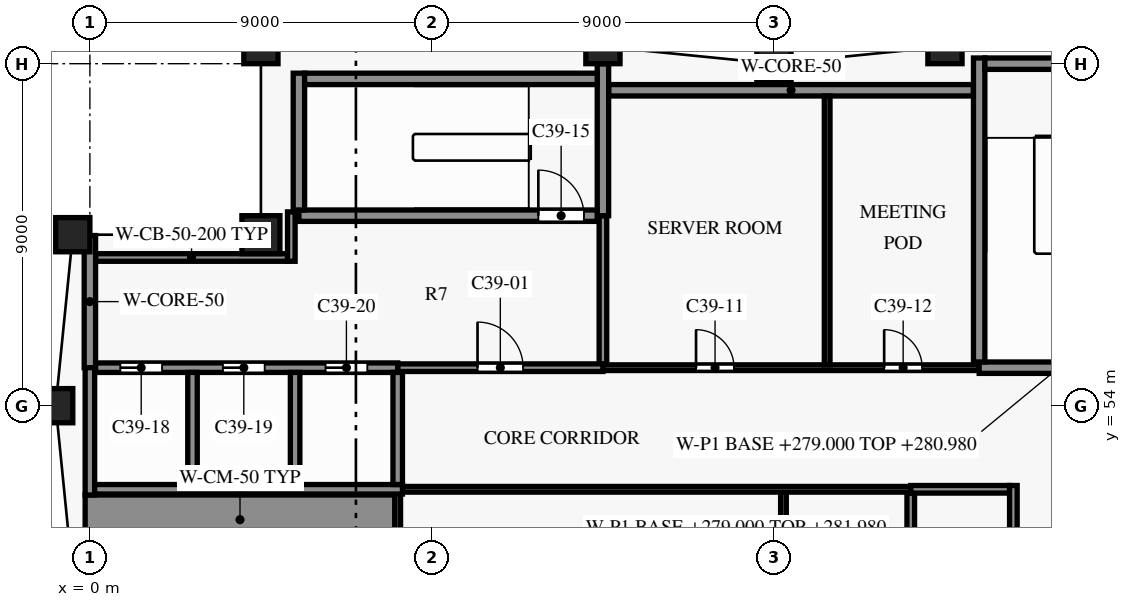
"""IFC4 building model, lengths in metres.
Left out: names, types, materials, properties, quantities, classifications, styles, units other than length and angle.
Written with IfcOpenShell. Run it as: python <this file> out.ifc"""

import sys

from ifc_helpers import new_model, si_unit, direction, frame, frame_2d, origin, origin_2d, place, context, subcontext, project, spatial, rectangle, extrude, element, fill, save


model = new_model("IFC4")
c1 = context("Model", 3, precision=1e-05, world=origin(), true_north=direction((0.0, 1.0)))
c2 = subcontext(c1, "Body", "Model", "MODEL_VIEW")
j1 = project(units=[si_unit("LENGTHUNIT", "METRE"), si_unit("PLANEANGLEUNIT", "RADIAN")], contexts=[c1])
p1 = place(None, origin())
s1 = spatial("IfcSite", under=j1, at=p1, CompositionType="ELEMENT")
p2 = place(p1, origin())
s2 = spatial("IfcBuilding", under=s1, at=p2, CompositionType="ELEMENT")
p3 = place(p2, frame((0.0, 0.0, 279.0)))
s3 = spatial("IfcBuildingStorey", under=s2, at=p3, CompositionType="ELEMENT", Elevation=279.0)
for number, where, z_axis, x_axis in (
    (1, (22.5, 63.45, 0.0), (0.0, 0.0, 1.0), (-0.995, -0.1, 0.0)),
    (2, (18.0, 63.0, 0.0), (0.0, 0.0, 1.0), (-1.0, 0.0, 0.0)),
    (3, (13.5, 63.45, 0.0), (0.0, 0.0, 1.0), (-0.995, 0.1, 0.0)),
    (4, (4.5, 63.45, 0.0), (0.0, 0.0, 1.0), (-0.995, -0.1, 0.0)),
    (5, (-0.45, 58.5, 0.0), (0.0, 0.0, 1.0), (-0.1, -0.995, 0.0)),
    (6, (-0.9, 54.0, 0.0), (0.0, 0.0, 1.0), (0.0, -1.0, 0.0)),
):
    element("IfcColumn", number, at=place(p3, frame(where, z_axis=z_axis, x_axis=x_axis)), inside=s3, PredefinedType="COLUMN", context=c2, shape_type="SweptSolid", body=[
        extrude(rectangle(XDim=0.9, YDim=0.9, at=origin_2d()), origin(), (0.0, 0.0, 1.0), 3.8),
    ])
p4 = place(p3, frame((4.5, 58.5, 0.0), z_axis=(0.0, 0.0, 1.0), x_axis=(1.0, 0.0, 0.0)))
e7 = element("IfcColumn", 7, at=p4, inside=s3, PredefinedType="COLUMN", context=c2, shape_type="SweptSolid", body=[
    extrude(rectangle(XDim=1.0, YDim=1.0, at=origin_2d()), origin(), (0.0, 0.0, 1.0), 3.8),
])
p5 = place(p3, frame((-0.125, 51.0, 0.0), z_axis=(0.0, 0.0, 1.0), x_axis=(1.0, 0.0, 0.0)))
e8 = element("IfcWall", 8, at=p5, inside=s3, PredefinedType="SHEAR", context=c2, shape_type="SweptSolid", body=[
    extrude(rectangle(XDim=8.15, YDim=1.3, at=frame_2d((4.075, 0.0))), origin(), (0.0, 0.0, 1.0), 3.5),
])
p6 = place(p3, frame((8.225, 51.8, 0.0), z_axis=(0.0, 0.0, 1.0), x_axis=(1.0, 0.0, 0.0)))
e9 = element("IfcWall", 9, at=p6, inside=s3, PredefinedType="SHEAR", context=c2, shape_type="SweptSolid", body=[
    extrude(rectangle(XDim=13.375, YDim=0.15, at=frame_2d((6.688, 0.0))), origin(), (0.0, 0.0, 1.0), 3.5),
])
p7 = place(p3, frame((21.6, 51.8, 0.0), z_axis=(0.0, 0.0, 1.0), x_axis=(1.0, 0.0, 0.0)))
e10 = element("IfcWall", 10, at=p7, inside=s3, PredefinedType="SHEAR", context=c2, shape_type="SweptSolid", body=[
    extrude(rectangle(XDim=2.6, YDim=0.2, at=frame_2d((1.3, 0.0))), origin(), (0.0, 0.0, 1.0), 3.5),
])
p8 = place(p3, frame((0.125, 51.8, 0.0), z_axis=(0.0, 0.0, 1.0), x_axis=(1.0, 0.0, 0.0)))
e11 = element("IfcWall", 11, at=p8, inside=s3, PredefinedType="SHEAR", context=c2, shape_type="SweptSolid", body=[
    extrude(rectangle(XDim=8.1, YDim=0.25, at=frame_2d((4.05, 0.0))), origin(), (0.0, 0.0, 1.0), 3.5),
])
p9 = place(p3, frame((8.1, 55.0, 0.0), z_axis=(0.0, 0.0, 1.0), x_axis=(1.0, 0.0, 0.0)))
e12 = element("IfcWall", 12, at=p9, inside=s3, PredefinedType="SHEAR", context=c2, shape_type="SweptSolid", body=[
    extrude(rectangle(XDim=5.4, YDim=0.2, at=frame_2d((2.7, 0.0))), origin(), (0.0, 0.0, 1.0), 3.5),
])
p10 = place(p9, frame((2.1, 0.0, 0.0)))
e13 = element("IfcOpeningElement", 13, at=p10, cuts=e12, PredefinedType="OPENING", context=c2, shape_type="SweptSolid", body=[
    extrude(rectangle(XDim=1.2, YDim=2.2, at=frame_2d((0.6, 1.1))), frame((0.0, 0.11, 0.0), z_axis=(0.0, -1.0, 0.0), x_axis=(1.0, 0.0, 0.0)), (0.0, 0.0, 1.0), 0.22),
])
p11 = place(p3, frame((13.5, 55.0, 0.0), z_axis=(0.0, 0.0, 1.0), x_axis=(1.0, 0.0, 0.0)))
e14 = element("IfcWall", 14, at=p11, inside=s3, PredefinedType="SHEAR", context=c2, shape_type="SweptSolid", body=[
    extrude(rectangle(XDim=9.9, YDim=0.15, at=frame_2d((4.95, 0.0))), origin(), (0.0, 0.0, 1.0), 3.5),
])
p12 = place(p11, frame((2.45, 0.0, 0.0)))
e15 = element("IfcOpeningElement", 15, at=p12, cuts=e14, PredefinedType="OPENING", context=c2, shape_type="SweptSolid", body=[
    extrude(rectangle(XDim=1.0, YDim=2.1, at=frame_2d((0.5, 1.05))), frame((0.0, 0.085, 0.0), z_axis=(0.0, -1.0, 0.0), x_axis=(1.0, 0.0, 0.0)), (0.0, 0.0, 1.0), 0.17),
])
p13 = place(p11, frame((7.4, 0.0, 0.0)))
e16 = element("IfcOpeningElement", 16, at=p13, cuts=e14, PredefinedType="OPENING", context=c2, shape_type="SweptSolid", body=[
    extrude(rectangle(XDim=1.0, YDim=2.1, at=frame_2d((0.5, 1.05))), frame((0.0, 0.085, 0.0), z_axis=(0.0, -1.0, 0.0), x_axis=(1.0, 0.0, 0.0)), (0.0, 0.0, 1.0), 0.17),
])
p14 = place(p3, frame((0.15, 55.0, 0.0), z_axis=(0.0, 0.0, 1.0), x_axis=(1.0, 0.0, 0.0)))
e17 = element("IfcWall", 17, at=p14, inside=s3, PredefinedType="SHEAR", context=c2, shape_type="SweptSolid", body=[
    extrude(rectangle(XDim=7.95, YDim=0.25, at=frame_2d((3.975, 0.0))), origin(), (0.0, 0.0, 1.0), 3.5),
])
p15 = place(p14, frame((0.65, 0.0, 0.0)))
e18 = element("IfcOpeningElement", 18, at=p15, cuts=e17, PredefinedType="OPENING", context=c2, shape_type="SweptSolid", body=[
    extrude(rectangle(XDim=1.1, YDim=2.1, at=frame_2d((0.55, 1.05))), frame((0.0, 0.135, 0.0), z_axis=(0.0, -1.0, 0.0), x_axis=(1.0, 0.0, 0.0)), (0.0, 0.0, 1.0), 0.27),
])
p16 = place(p14, frame((3.35, 0.0, 0.0)))
e19 = element("IfcOpeningElement", 19, at=p16, cuts=e17, PredefinedType="OPENING", context=c2, shape_type="SweptSolid", body=[
    extrude(rectangle(XDim=1.1, YDim=2.1, at=frame_2d((0.55, 1.05))), frame((0.0, 0.135, 0.0), z_axis=(0.0, -1.0, 0.0), x_axis=(1.0, 0.0, 0.0)), (0.0, 0.0, 1.0), 0.27),
])
p17 = place(p14, frame((6.05, 0.0, 0.0)))
e20 = element("IfcOpeningElement", 20, at=p17, cuts=e17, PredefinedType="OPENING", context=c2, shape_type="SweptSolid", body=[
    extrude(rectangle(XDim=1.1, YDim=2.1, at=frame_2d((0.55, 1.05))), frame((0.0, 0.135, 0.0), z_axis=(0.0, -1.0, 0.0), x_axis=(1.0, 0.0, 0.0)), (0.0, 0.0, 1.0), 0.27),
])
p18 = place(p3, frame((23.4, 55.0, 0.0), z_axis=(0.0, 0.0, 1.0), x_axis=(1.0, 0.0, 0.0)))
e21 = element("IfcWall", 21, at=p18, inside=s3, PredefinedType="SHEAR", context=c2, shape_type="SweptSolid", body=[
    extrude(rectangle(XDim=3.45, YDim=0.3, at=frame_2d((1.725, 0.0))), origin(), (0.0, 0.0, 1.0), 3.5),
])
p19 = place(p3, frame((0.15, 57.9, 0.0), z_axis=(0.0, 0.0, 1.0), x_axis=(1.0, 0.0, 0.0)))
e22 = element("IfcWall", 22, at=p19, inside=s3, PredefinedType="SHEAR", context=c2, shape_type="SweptSolid", body=[
    extrude(rectangle(XDim=5.05, YDim=0.2, at=frame_2d((2.525, 0.0))), origin(), (0.0, 0.0, 1.0), 3.5),
])
p20 = place(p3, frame((5.5, 59.0, 0.0), z_axis=(0.0, 0.0, 1.0), x_axis=(1.0, 0.0, 0.0)))
e23 = element("IfcWall", 23, at=p20, inside=s3, PredefinedType="SHEAR", context=c2, shape_type="SweptSolid", body=[
    extrude(rectangle(XDim=7.85, YDim=0.3, at=frame_2d((3.925, 0.0))), origin(), (0.0, 0.0, 1.0), 3.5),
])
p21 = place(p20, frame((6.3, 0.0, 0.0)))
e24 = element("IfcOpeningElement", 24, at=p21, cuts=e23, PredefinedType="OPENING", context=c2, shape_type="SweptSolid", body=[
    extrude(rectangle(XDim=1.2, YDim=2.2, at=frame_2d((0.6, 1.1))), frame((0.0, 0.16, 0.0), z_axis=(0.0, -1.0, 0.0), x_axis=(1.0, 0.0, 0.0)), (0.0, 0.0, 1.0), 0.32),
])
p22 = place(p3, frame((13.65, 62.3, 0.0), z_axis=(0.0, 0.0, 1.0), x_axis=(1.0, 0.0, 0.0)))
e25 = element("IfcWall", 25, at=p22, inside=s3, PredefinedType="SHEAR", context=c2, shape_type="SweptSolid", body=[
    extrude(rectangle(XDim=9.6, YDim=0.3, at=frame_2d((4.8, 0.0))), origin(), (0.0, 0.0, 1.0), 3.5),
])
p23 = place(p3, frame((5.65, 62.6, 0.0), z_axis=(0.0, 0.0, 1.0), x_axis=(1.0, 0.0, 0.0)))
e26 = element("IfcWall", 26, at=p23, inside=s3, PredefinedType="SHEAR", context=c2, shape_type="SweptSolid", body=[
    extrude(rectangle(XDim=7.7, YDim=0.3, at=frame_2d((3.85, 0.0))), origin(), (0.0, 0.0, 1.0), 3.5),
])
p24 = place(p3, frame((23.55, 63.0, 0.0), z_axis=(0.0, 0.0, 1.0), x_axis=(1.0, 0.0, 0.0)))
e27 = element("IfcWall", 27, at=p24, inside=s3, PredefinedType="SHEAR", context=c2, shape_type="SweptSolid", body=[
    extrude(rectangle(XDim=3.3, YDim=0.3, at=frame_2d((1.65, 0.0))), origin(), (0.0, 0.0, 1.0), 3.5),
])
p25 = place(p3, frame((0.0, 55.0, 0.0), z_axis=(0.0, 0.0, 1.0), x_axis=(0.0, 1.0, 0.0)))
e28 = element("IfcWall", 28, at=p25, inside=s3, PredefinedType="SHEAR", context=c2, shape_type="SweptSolid", body=[
    extrude(rectangle(XDim=3.478, YDim=0.3, at=frame_2d((1.739, 0.0))), origin(), (0.0, 0.0, 1.0), 3.5),
])
p26 = place(p3, frame((0.0, 51.65, 0.0), z_axis=(0.0, 0.0, 1.0), x_axis=(0.0, 1.0, 0.0)))
e29 = element("IfcWall", 29, at=p26, inside=s3, PredefinedType="SHEAR", context=c2, shape_type="SweptSolid", body=[
    extrude(rectangle(XDim=3.35, YDim=0.25, at=frame_2d((1.675, 0.0))), origin(), (0.0, 0.0, 1.0), 3.5),
])
p27 = place(p3, frame((2.7, 51.925, 0.0), z_axis=(0.0, 0.0, 1.0), x_axis=(0.0, 1.0, 0.0)))
e30 = element("IfcWall", 30, at=p27, inside=s3, PredefinedType="SHEAR", context=c2, shape_type="SweptSolid", body=[
    extrude(rectangle(XDim=2.95, YDim=0.25, at=frame_2d((1.475, 0.0))), origin(), (0.0, 0.0, 1.0), 3.5),
])
p28 = place(p3, frame((5.3, 57.8, 0.0), z_axis=(0.0, 0.0, 1.0), x_axis=(0.0, 1.0, 0.0)))
e31 = element("IfcWall", 31, at=p28, inside=s3, PredefinedType="SHEAR", context=c2, shape_type="SweptSolid", body=[
    extrude(rectangle(XDim=1.3, YDim=0.2, at=frame_2d((0.65, 0.0))), origin(), (0.0, 0.0, 1.0), 3.5),
])
p29 = place(p3, frame((5.4, 51.925, 0.0), z_axis=(0.0, 0.0, 1.0), x_axis=(0.0, 1.0, 0.0)))
e32 = element("IfcWall", 32, at=p29, inside=s3, PredefinedType="SHEAR", context=c2, shape_type="SweptSolid", body=[
    extrude(rectangle(XDim=2.95, YDim=0.25, at=frame_2d((1.475, 0.0))), origin(), (0.0, 0.0, 1.0), 3.5),
])
p30 = place(p3, frame((5.5, 59.15, 0.0), z_axis=(0.0, 0.0, 1.0), x_axis=(0.0, 1.0, 0.0)))
e33 = element("IfcWall", 33, at=p30, inside=s3, PredefinedType="SHEAR", context=c2, shape_type="SweptSolid", body=[
    extrude(rectangle(XDim=3.6, YDim=0.3, at=frame_2d((1.8, 0.0))), origin(), (0.0, 0.0, 1.0), 3.5),
])
p31 = place(p3, frame((8.1, 50.2, 0.0), z_axis=(0.0, 0.0, 1.0), x_axis=(0.0, 1.0, 0.0)))
e34 = element("IfcWall", 34, at=p31, inside=s3, PredefinedType="SHEAR", context=c2, shape_type="SweptSolid", body=[
    extrude(rectangle(XDim=1.475, YDim=0.15, at=frame_2d((0.738, 0.0))), origin(), (0.0, 0.0, 1.0), 3.5),
])
p32 = place(p3, frame((8.1, 51.925, 0.0), z_axis=(0.0, 0.0, 1.0), x_axis=(0.0, 1.0, 0.0)))
e35 = element("IfcWall", 35, at=p32, inside=s3, PredefinedType="SHEAR", context=c2, shape_type="SweptSolid", body=[
    extrude(rectangle(XDim=2.95, YDim=0.25, at=frame_2d((1.475, 0.0))), origin(), (0.0, 0.0, 1.0), 3.5),
])
p33 = place(p3, frame((13.5, 55.1, 0.0), z_axis=(0.0, 0.0, 1.0), x_axis=(0.0, 1.0, 0.0)))
e36 = element("IfcWall", 36, at=p33, inside=s3, PredefinedType="SHEAR", context=c2, shape_type="SweptSolid", body=[
    extrude(rectangle(XDim=3.9, YDim=0.2, at=frame_2d((1.95, 0.0))), origin(), (0.0, 0.0, 1.0), 3.5),
])
p34 = place(p3, frame((13.5, 59.0, 0.0), z_axis=(0.0, 0.0, 1.0), x_axis=(0.0, 1.0, 0.0)))
e37 = element("IfcWall", 37, at=p34, inside=s3, PredefinedType="SHEAR", context=c2, shape_type="SweptSolid", body=[
    extrude(rectangle(XDim=3.998, YDim=0.3, at=frame_2d((1.999, 0.0))), origin(), (0.0, 0.0, 1.0), 3.5),
])
p35 = place(p3, frame((18.25, 47.075, 0.0), z_axis=(0.0, 0.0, 1.0), x_axis=(0.0, 1.0, 0.0)))
e38 = element("IfcWall", 38, at=p35, inside=s3, PredefinedType="SHEAR", context=c2, shape_type="SweptSolid", body=[
    extrude(rectangle(XDim=4.65, YDim=0.15, at=frame_2d((2.325, 0.0))), origin(), (0.0, 0.0, 1.0), 3.5),
])
p36 = place(p3, frame((19.4, 55.075, 0.0), z_axis=(0.0, 0.0, 1.0), x_axis=(0.0, 1.0, 0.0)))
e39 = element("IfcWall", 39, at=p36, inside=s3, PredefinedType="SHEAR", context=c2, shape_type="SweptSolid", body=[
    extrude(rectangle(XDim=7.075, YDim=0.15, at=frame_2d((3.538, 0.0))), origin(), (0.0, 0.0, 1.0), 3.5),
])
p37 = place(p3, frame((21.6, 47.1, 0.0), z_axis=(0.0, 0.0, 1.0), x_axis=(0.0, 1.0, 0.0)))
e40 = element("IfcWall", 40, at=p37, inside=s3, PredefinedType="SHEAR", context=c2, shape_type="SweptSolid", body=[
    extrude(rectangle(XDim=4.6, YDim=0.2, at=frame_2d((2.3, 0.0))), origin(), (0.0, 0.0, 1.0), 3.5),
])
p38 = place(p3, frame((23.4, 55.15, 0.0), z_axis=(0.0, 0.0, 1.0), x_axis=(0.0, 1.0, 0.0)))
e41 = element("IfcWall", 41, at=p38, inside=s3, PredefinedType="SHEAR", context=c2, shape_type="SweptSolid", body=[
    extrude(rectangle(XDim=8.0, YDim=0.3, at=frame_2d((4.0, 0.0))), origin(), (0.0, 0.0, 1.0), 3.5),
])
p39 = place(p3, frame((24.3, 46.9, 0.0), z_axis=(0.0, 0.0, 1.0), x_axis=(0.0, 1.0, 0.0)))
e42 = element("IfcWall", 42, at=p39, inside=s3, PredefinedType="SHEAR", context=c2, shape_type="SweptSolid", body=[
    extrude(rectangle(XDim=5.0, YDim=0.2, at=frame_2d((2.5, 0.0))), origin(), (0.0, 0.0, 1.0), 3.5),
])
p40 = place(p10, origin())
e43 = element("IfcDoor", 43, at=p40, inside=s3, OperationType="SINGLE_SWING_RIGHT", PredefinedType="DOOR", context=c2, shape_type="SweptSolid", body=[
    extrude(rectangle(XDim=1.2, YDim=2.2, at=frame_2d((0.6, 1.1))), frame((0.0, 0.025, 0.0), z_axis=(0.0, -1.0, 0.0), x_axis=(1.0, 0.0, 0.0)), (0.0, 0.0, 1.0), 0.05),
])
fill(e13, e43)
p41 = place(p12, origin())
e44 = element("IfcDoor", 44, at=p41, inside=s3, OperationType="SINGLE_SWING_LEFT", PredefinedType="DOOR", context=c2, shape_type="SweptSolid", body=[
    extrude(rectangle(XDim=1.0, YDim=2.1, at=frame_2d((0.5, 1.05))), frame((0.0, 0.025, 0.0), z_axis=(0.0, -1.0, 0.0), x_axis=(1.0, 0.0, 0.0)), (0.0, 0.0, 1.0), 0.05),
])
fill(e15, e44)
p42 = place(p13, origin())
e45 = element("IfcDoor", 45, at=p42, inside=s3, OperationType="SINGLE_SWING_RIGHT", PredefinedType="DOOR", context=c2, shape_type="SweptSolid", body=[
    extrude(rectangle(XDim=1.0, YDim=2.1, at=frame_2d((0.5, 1.05))), frame((0.0, 0.025, 0.0), z_axis=(0.0, -1.0, 0.0), x_axis=(1.0, 0.0, 0.0)), (0.0, 0.0, 1.0), 0.05),
])
fill(e16, e45)
p43 = place(p21, origin())
e46 = element("IfcDoor", 46, at=p43, inside=s3, OperationType="SINGLE_SWING_RIGHT", PredefinedType="DOOR", context=c2, shape_type="SweptSolid", body=[
    extrude(rectangle(XDim=1.2, YDim=2.2, at=frame_2d((0.6, 1.1))), frame((0.0, 0.025, 0.0), z_axis=(0.0, -1.0, 0.0), x_axis=(1.0, 0.0, 0.0)), (0.0, 0.0, 1.0), 0.05),
])
fill(e24, e46)
p44 = place(p15, origin())
e47 = element("IfcDoor", 47, at=p44, inside=s3, OperationType="DOUBLE_DOOR_SLIDING", PredefinedType="DOOR", context=c2, shape_type="SweptSolid", body=[
    extrude(rectangle(XDim=1.1, YDim=2.1, at=frame_2d((0.55, 1.05))), frame((0.0, 0.025, 0.0), z_axis=(0.0, -1.0, 0.0), x_axis=(1.0, 0.0, 0.0)), (0.0, 0.0, 1.0), 0.05),
])
fill(e18, e47)
p45 = place(p16, origin())
e48 = element("IfcDoor", 48, at=p45, inside=s3, OperationType="DOUBLE_DOOR_SLIDING", PredefinedType="DOOR", context=c2, shape_type="SweptSolid", body=[
    extrude(rectangle(XDim=1.1, YDim=2.1, at=frame_2d((0.55, 1.05))), frame((0.0, 0.025, 0.0), z_axis=(0.0, -1.0, 0.0), x_axis=(1.0, 0.0, 0.0)), (0.0, 0.0, 1.0), 0.05),
])
fill(e19, e48)
p46 = place(p17, origin())
e49 = element("IfcDoor", 49, at=p46, inside=s3, OperationType="DOUBLE_DOOR_SLIDING", PredefinedType="DOOR", context=c2, shape_type="SweptSolid", body=[
    extrude(rectangle(XDim=1.1, YDim=2.1, at=frame_2d((0.55, 1.05))), frame((0.0, 0.025, 0.0), z_axis=(0.0, -1.0, 0.0), x_axis=(1.0, 0.0, 0.0)), (0.0, 0.0, 1.0), 0.05),
])
fill(e20, e49)
save(model, sys.argv[1])
